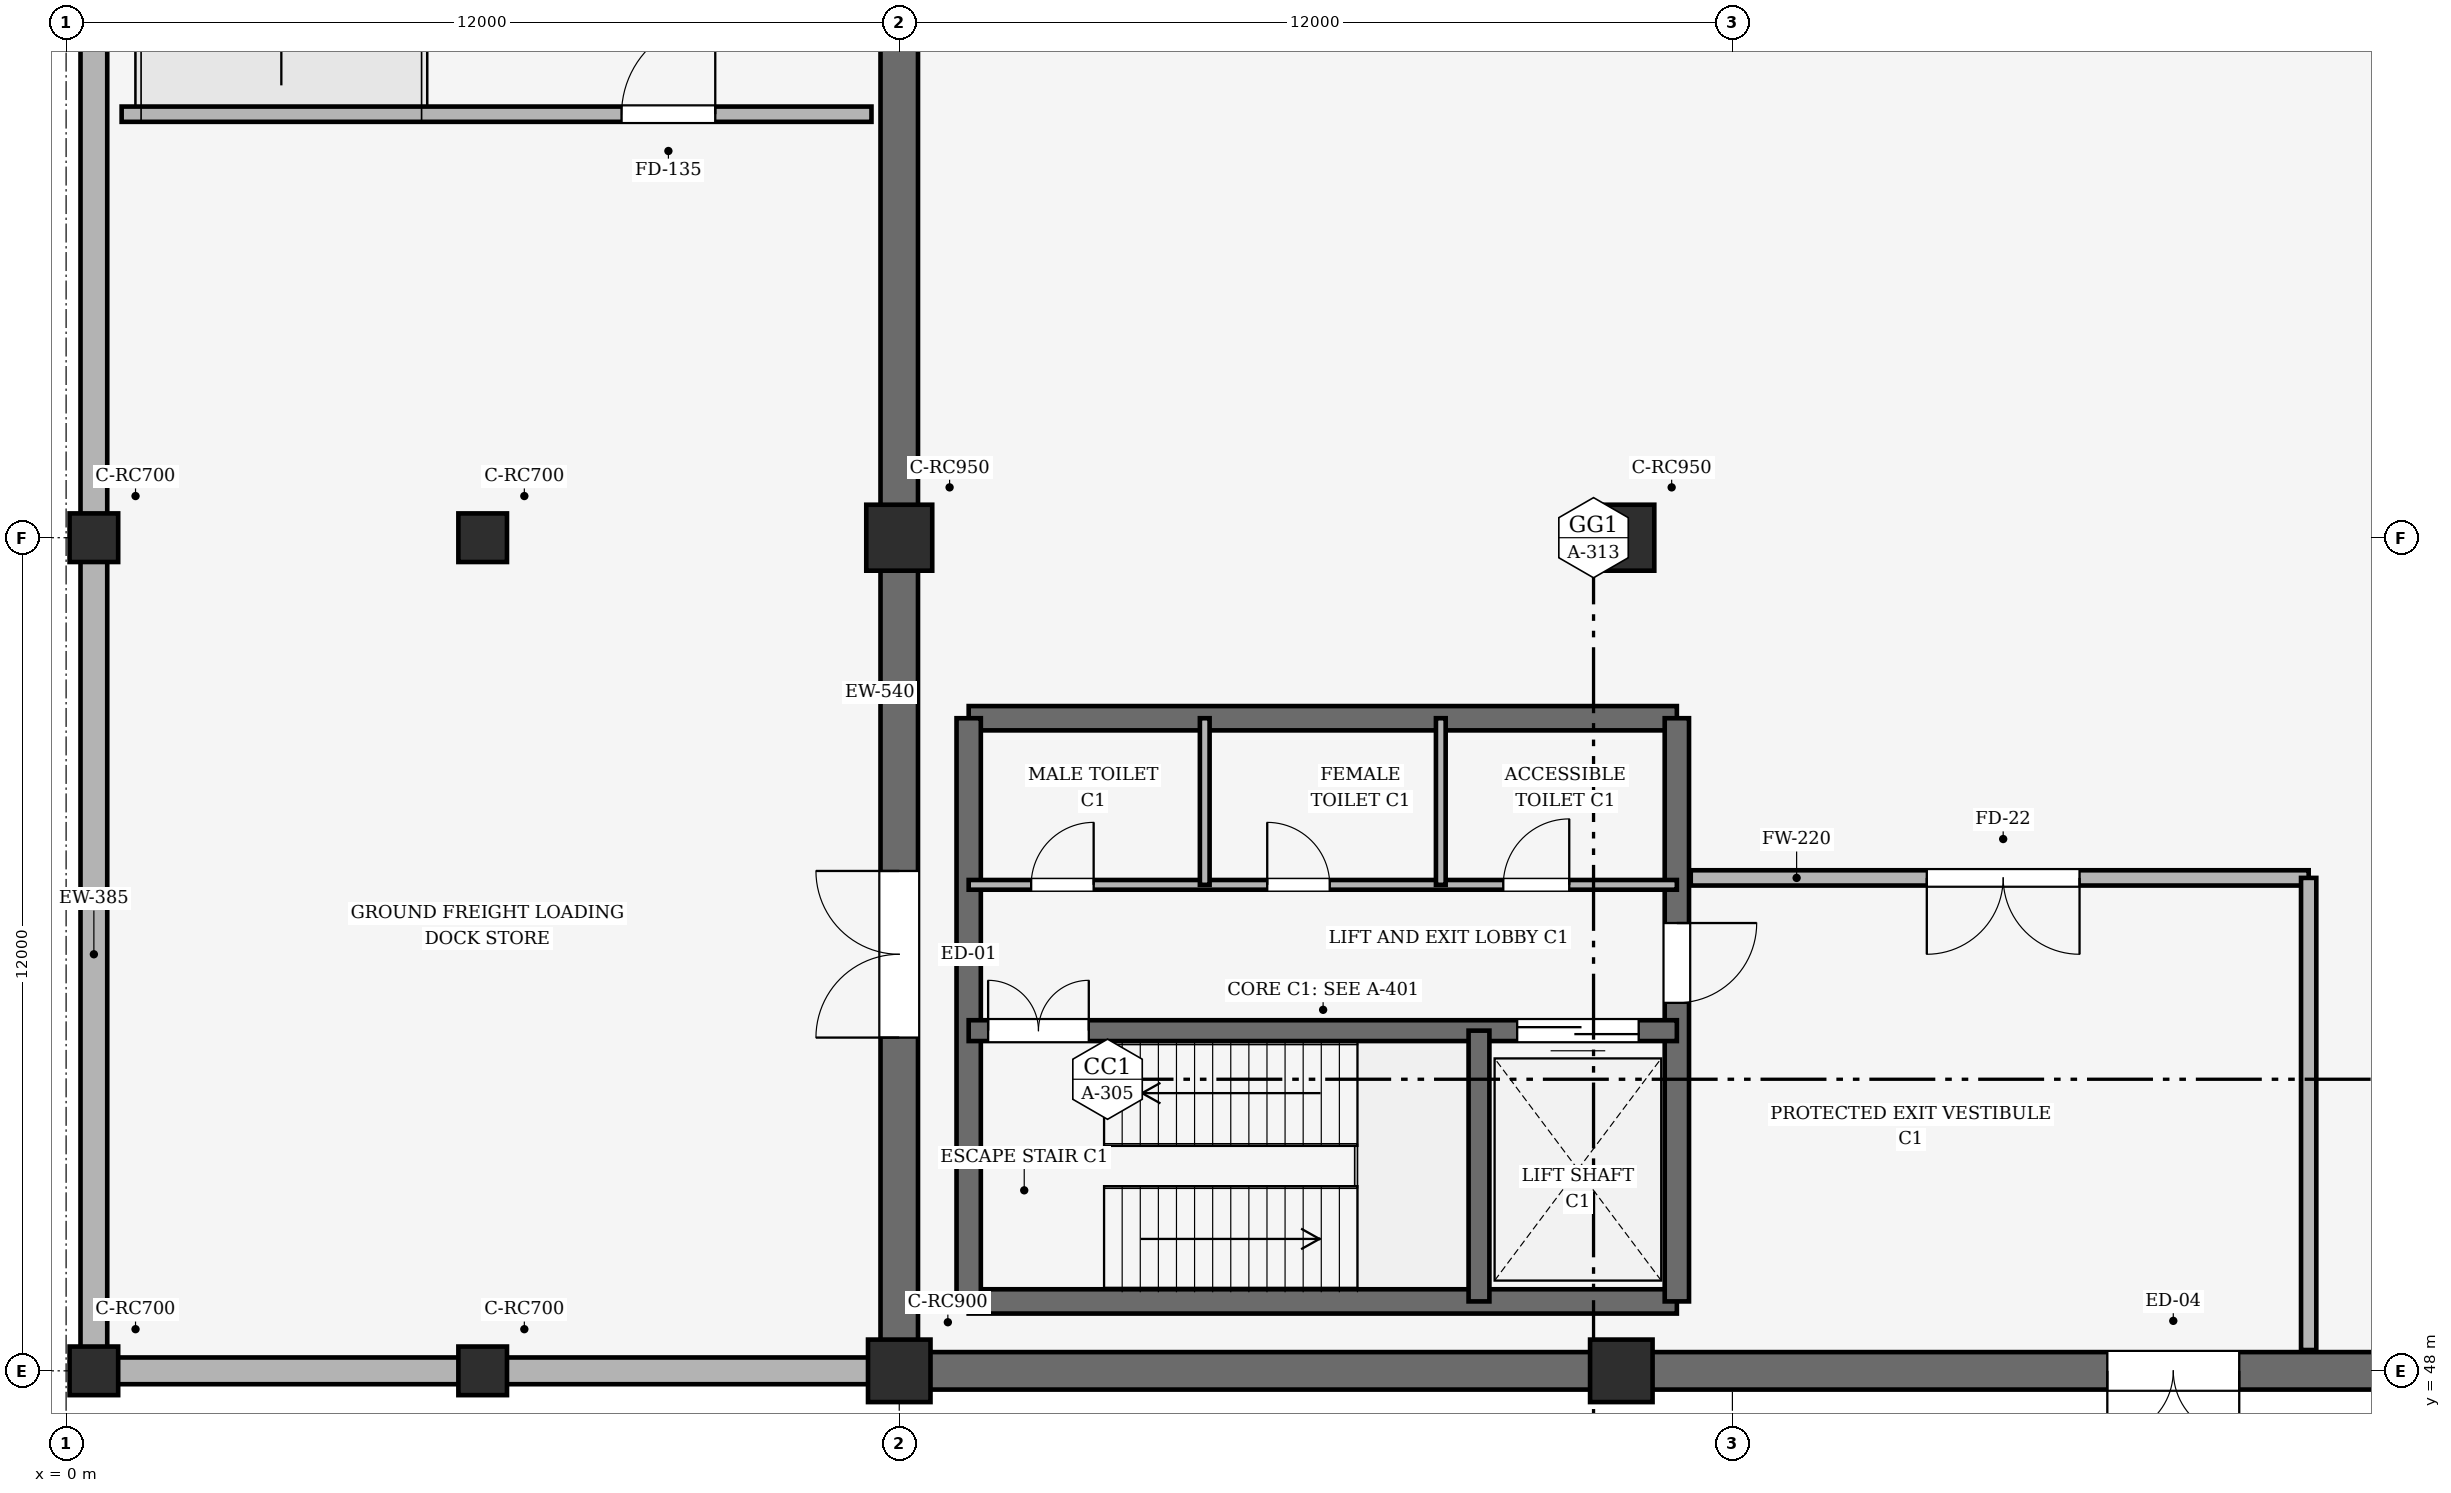
"""IFC4 building model, lengths in metres.
Left out: names, types, materials, properties, quantities, classifications, styles, units other than length and angle.
Written with IfcOpenShell. Run it as: python <this file> out.ifc"""

import sys

from ifc_helpers import new_model, si_unit, direction, frame, frame_2d, origin, origin_2d, place, context, subcontext, project, spatial, rectangle, extrude, element, fill, save


model = new_model("IFC4")
c1 = context("Model", 3, precision=1e-05, world=origin(), true_north=direction((0.0, 1.0)))
c2 = subcontext(c1, "Body", "Model", "MODEL_VIEW")
j1 = project(units=[si_unit("LENGTHUNIT", "METRE"), si_unit("PLANEANGLEUNIT", "RADIAN")], contexts=[c1])
p1 = place(None, origin())
s1 = spatial("IfcSite", under=j1, at=p1, CompositionType="ELEMENT")
p2 = place(p1, origin())
s2 = spatial("IfcBuilding", under=s1, at=p2, CompositionType="ELEMENT")
p3 = place(p2, origin())
s3 = spatial("IfcBuildingStorey", under=s2, at=p3, CompositionType="ELEMENT", Elevation=0.0)
for number, where, z_axis, x_axis in (
    (1, (12.0, 48.0, -0.44), (0.0, 0.0, 1.0), (1.0, 0.0, 0.0)),
    (2, (22.4, 48.0, -0.44), (0.0, 0.0, 1.0), (1.0, 0.0, 0.0)),
):
    element("IfcColumn", number, at=place(p3, frame(where, z_axis=z_axis, x_axis=x_axis)), inside=s3, PredefinedType="COLUMN", context=c2, shape_type="SweptSolid", body=[
        extrude(rectangle(XDim=0.9, YDim=0.9, at=origin_2d()), origin(), (0.0, 0.0, 1.0), 5.84),
    ])
for number, where, z_axis, x_axis in (
    (3, (12.0, 60.0, -0.44), (0.0, 0.0, 1.0), (1.0, 0.0, 0.0)),
    (4, (22.4, 60.0, -0.44), (0.0, 0.0, 1.0), (1.0, 0.0, 0.0)),
):
    element("IfcColumn", number, at=place(p3, frame(where, z_axis=z_axis, x_axis=x_axis)), inside=s3, PredefinedType="COLUMN", context=c2, shape_type="SweptSolid", body=[
        extrude(rectangle(XDim=0.95, YDim=0.95, at=origin_2d()), origin(), (0.0, 0.0, 1.0), 5.84),
    ])
for number, where, z_axis, x_axis in (
    (5, (0.4, 48.0, -0.44), (0.0, 0.0, 1.0), (1.0, 0.0, 0.0)),
    (6, (6.0, 48.0, -0.44), (0.0, 0.0, 1.0), (1.0, 0.0, 0.0)),
    (7, (0.4, 60.0, -0.44), (0.0, 0.0, 1.0), (1.0, 0.0, 0.0)),
    (8, (6.0, 60.0, -0.44), (0.0, 0.0, 1.0), (1.0, 0.0, 0.0)),
):
    element("IfcColumn", number, at=place(p3, frame(where, z_axis=z_axis, x_axis=x_axis)), inside=s3, PredefinedType="COLUMN", context=c2, shape_type="SweptSolid", body=[
        extrude(rectangle(XDim=0.7, YDim=0.7, at=origin_2d()), origin(), (0.0, 0.0, 1.0), 5.84),
    ])
p4 = place(p3, frame((12.0, 60.0, 0.0), z_axis=(0.0, 0.0, 1.0), x_axis=(0.0, -1.0, 0.0)))
e9 = element("IfcWall", 9, at=p4, inside=s3, PredefinedType="SOLIDWALL", context=c2, shape_type="SweptSolid", body=[
    extrude(rectangle(XDim=12.0, YDim=0.54, at=frame_2d((6.0, 0.0))), origin(), (0.0, 0.0, 1.0), 4.95),
])
p5 = place(p4, frame((4.8, 0.0, 0.0)))
e10 = element("IfcOpeningElement", 10, at=p5, cuts=e9, PredefinedType="OPENING", context=c2, shape_type="SweptSolid", body=[
    extrude(rectangle(XDim=2.4, YDim=2.65, at=frame_2d((1.2, 1.325))), frame((0.0, 0.28, 0.0), z_axis=(0.0, -1.0, 0.0), x_axis=(1.0, 0.0, 0.0)), (0.0, 0.0, 1.0), 0.56),
])
p6 = place(p3, frame((12.0, 72.0, 0.0), z_axis=(0.0, 0.0, 1.0), x_axis=(0.0, -1.0, 0.0)))
e11 = element("IfcWall", 11, at=p6, inside=s3, PredefinedType="SOLIDWALL", context=c2, shape_type="SweptSolid", body=[
    extrude(rectangle(XDim=12.0, YDim=0.54, at=frame_2d((6.0, 0.0))), origin(), (0.0, 0.0, 1.0), 4.95),
])
p7 = place(p6, frame((2.0, 0.0, 0.0)))
e12 = element("IfcOpeningElement", 12, at=p7, cuts=e11, PredefinedType="OPENING", context=c2, shape_type="SweptSolid", body=[
    extrude(rectangle(XDim=2.3, YDim=2.55, at=frame_2d((1.15, 1.275))), frame((0.0, 0.28, 0.0), z_axis=(0.0, -1.0, 0.0), x_axis=(1.0, 0.0, 0.0)), (0.0, 0.0, 1.0), 0.56),
])
p8 = place(p3, frame((12.0, 48.0, 0.0), z_axis=(0.0, 0.0, 1.0), x_axis=(1.0, 0.0, 0.0)))
e13 = element("IfcWall", 13, at=p8, inside=s3, PredefinedType="SOLIDWALL", context=c2, shape_type="SweptSolid", body=[
    extrude(rectangle(XDim=10.4, YDim=0.54, at=frame_2d((5.2, 0.0))), origin(), (0.0, 0.0, 1.0), 4.95),
])
p9 = place(p3, frame((22.4, 48.0, 0.0), z_axis=(0.0, 0.0, 1.0), x_axis=(1.0, 0.0, 0.0)))
e14 = element("IfcWall", 14, at=p9, inside=s3, PredefinedType="SOLIDWALL", context=c2, shape_type="SweptSolid", body=[
    extrude(rectangle(XDim=33.2, YDim=0.54, at=frame_2d((16.6, 0.0))), origin(), (0.0, 0.0, 1.0), 4.95),
])
p10 = place(p9, frame((7.0, 0.0, 0.0)))
e15 = element("IfcOpeningElement", 15, at=p10, cuts=e14, PredefinedType="OPENING", context=c2, shape_type="SweptSolid", body=[
    extrude(rectangle(XDim=1.9, YDim=2.35, at=frame_2d((0.95, 1.175))), frame((0.0, 0.28, 0.0), z_axis=(0.0, -1.0, 0.0), x_axis=(1.0, 0.0, 0.0)), (0.0, 0.0, 1.0), 0.56),
])
p11 = place(p9, frame((23.0, 0.0, 0.0)))
e16 = element("IfcOpeningElement", 16, at=p11, cuts=e14, PredefinedType="OPENING", context=c2, shape_type="SweptSolid", body=[
    extrude(rectangle(XDim=2.4, YDim=2.65, at=frame_2d((1.2, 1.325))), frame((0.0, 0.28, 0.0), z_axis=(0.0, -1.0, 0.0), x_axis=(1.0, 0.0, 0.0)), (0.0, 0.0, 1.0), 0.56),
])
p12 = place(p3, frame((0.4, 60.0, 0.0), z_axis=(0.0, 0.0, 1.0), x_axis=(0.0, -1.0, 0.0)))
e17 = element("IfcWall", 17, at=p12, inside=s3, PredefinedType="SOLIDWALL", context=c2, shape_type="SweptSolid", body=[
    extrude(rectangle(XDim=12.0, YDim=0.385, at=frame_2d((6.0, 0.0))), origin(), (0.0, 0.0, 1.0), 4.2),
])
p13 = place(p3, frame((0.4, 72.0, 0.0), z_axis=(0.0, 0.0, 1.0), x_axis=(0.0, -1.0, 0.0)))
e18 = element("IfcWall", 18, at=p13, inside=s3, PredefinedType="SOLIDWALL", context=c2, shape_type="SweptSolid", body=[
    extrude(rectangle(XDim=12.0, YDim=0.385, at=frame_2d((6.0, 0.0))), origin(), (0.0, 0.0, 1.0), 3.738),
])
p14 = place(p3, frame((0.4, 48.0, 0.0), z_axis=(0.0, 0.0, 1.0), x_axis=(1.0, 0.0, 0.0)))
e19 = element("IfcWall", 19, at=p14, inside=s3, PredefinedType="SOLIDWALL", context=c2, shape_type="SweptSolid", body=[
    extrude(rectangle(XDim=11.6, YDim=0.385, at=frame_2d((5.8, 0.0))), origin(), (0.0, 0.0, 1.0), 4.2),
])
for number, where, z_axis, x_axis in (
    (20, (13.0, 49.0, 0.0), (0.0, 0.0, 1.0), (1.0, 0.0, 0.0)),
    (21, (23.2, 57.4, 0.0), (0.0, 0.0, 1.0), (-1.0, 0.0, 0.0)),
):
    element("IfcWall", number, at=place(p3, frame(where, z_axis=z_axis, x_axis=x_axis)), inside=s3, PredefinedType="SHEAR", context=c2, shape_type="SweptSolid", body=[
        extrude(rectangle(XDim=10.2, YDim=0.35, at=frame_2d((5.1, 0.0))), origin(), (0.0, 0.0, 1.0), 5.4),
    ])
p15 = place(p3, frame((13.0, 57.4, 0.0), z_axis=(0.0, 0.0, 1.0), x_axis=(0.0, -1.0, 0.0)))
e22 = element("IfcWall", 22, at=p15, inside=s3, PredefinedType="SHEAR", context=c2, shape_type="SweptSolid", body=[
    extrude(rectangle(XDim=8.4, YDim=0.35, at=frame_2d((4.2, 0.0))), origin(), (0.0, 0.0, 1.0), 5.4),
])
p16 = place(p3, frame((23.2, 49.0, 0.0), z_axis=(0.0, 0.0, 1.0), x_axis=(0.0, 1.0, 0.0)))
e23 = element("IfcWall", 23, at=p16, inside=s3, PredefinedType="SHEAR", context=c2, shape_type="SweptSolid", body=[
    extrude(rectangle(XDim=8.4, YDim=0.35, at=frame_2d((4.2, 0.0))), origin(), (0.0, 0.0, 1.0), 5.4),
])
p17 = place(p16, frame((4.3, 0.0, 0.0)))
e24 = element("IfcOpeningElement", 24, at=p17, cuts=e23, PredefinedType="OPENING", context=c2, shape_type="SweptSolid", body=[
    extrude(rectangle(XDim=1.15, YDim=2.15, at=frame_2d((0.575, 1.075))), frame((0.0, 0.185, 0.0), z_axis=(0.0, -1.0, 0.0), x_axis=(1.0, 0.0, 0.0)), (0.0, 0.0, 1.0), 0.37),
])
p18 = place(p3, frame((13.0, 52.9, 0.0), z_axis=(0.0, 0.0, 1.0), x_axis=(1.0, 0.0, 0.0)))
e25 = element("IfcWall", 25, at=p18, inside=s3, PredefinedType="SHEAR", context=c2, shape_type="SweptSolid", body=[
    extrude(rectangle(XDim=10.2, YDim=0.3, at=frame_2d((5.1, 0.0))), origin(), (0.0, 0.0, 1.0), 5.4),
])
p19 = place(p18, frame((0.28, 0.0, 0.0)))
e26 = element("IfcOpeningElement", 26, at=p19, cuts=e25, PredefinedType="OPENING", context=c2, shape_type="SweptSolid", body=[
    extrude(rectangle(XDim=1.45, YDim=2.15, at=frame_2d((0.725, 1.075))), frame((0.0, 0.16, 0.0), z_axis=(0.0, -1.0, 0.0), x_axis=(1.0, 0.0, 0.0)), (0.0, 0.0, 1.0), 0.32),
])
p20 = place(p18, frame((7.9, 0.0, 0.0)))
e27 = element("IfcOpeningElement", 27, at=p20, cuts=e25, PredefinedType="OPENING", context=c2, shape_type="SweptSolid", body=[
    extrude(rectangle(XDim=1.75, YDim=2.3, at=frame_2d((0.875, 1.15))), frame((0.0, 0.16, 0.0), z_axis=(0.0, -1.0, 0.0), x_axis=(1.0, 0.0, 0.0)), (0.0, 0.0, 1.0), 0.32),
])
p21 = place(p3, frame((20.35, 49.0, 0.0), z_axis=(0.0, 0.0, 1.0), x_axis=(0.0, 1.0, 0.0)))
e28 = element("IfcWall", 28, at=p21, inside=s3, PredefinedType="SHEAR", context=c2, shape_type="SweptSolid", body=[
    extrude(rectangle(XDim=3.9, YDim=0.3, at=frame_2d((1.95, 0.0))), origin(), (0.0, 0.0, 1.0), 5.4),
])
p22 = place(p3, frame((13.0, 55.0, 0.0), z_axis=(0.0, 0.0, 1.0), x_axis=(1.0, 0.0, 0.0)))
e29 = element("IfcWall", 29, at=p22, inside=s3, PredefinedType="PARTITIONING", context=c2, shape_type="SweptSolid", body=[
    extrude(rectangle(XDim=10.2, YDim=0.14, at=frame_2d((5.1, 0.0))), origin(), (0.0, 0.0, 1.0), 4.5),
])
p23 = place(p22, frame((0.9, 0.0, 0.0)))
e30 = element("IfcOpeningElement", 30, at=p23, cuts=e29, PredefinedType="OPENING", context=c2, shape_type="SweptSolid", body=[
    extrude(rectangle(XDim=0.9, YDim=2.1, at=frame_2d((0.45, 1.05))), frame((0.0, 0.08, 0.0), z_axis=(0.0, -1.0, 0.0), x_axis=(1.0, 0.0, 0.0)), (0.0, 0.0, 1.0), 0.16),
])
p24 = place(p22, frame((4.3, 0.0, 0.0)))
e31 = element("IfcOpeningElement", 31, at=p24, cuts=e29, PredefinedType="OPENING", context=c2, shape_type="SweptSolid", body=[
    extrude(rectangle(XDim=0.9, YDim=2.1, at=frame_2d((0.45, 1.05))), frame((0.0, 0.08, 0.0), z_axis=(0.0, -1.0, 0.0), x_axis=(1.0, 0.0, 0.0)), (0.0, 0.0, 1.0), 0.16),
])
p25 = place(p22, frame((7.7, 0.0, 0.0)))
e32 = element("IfcOpeningElement", 32, at=p25, cuts=e29, PredefinedType="OPENING", context=c2, shape_type="SweptSolid", body=[
    extrude(rectangle(XDim=0.95, YDim=2.1, at=frame_2d((0.475, 1.05))), frame((0.0, 0.08, 0.0), z_axis=(0.0, -1.0, 0.0), x_axis=(1.0, 0.0, 0.0)), (0.0, 0.0, 1.0), 0.16),
])
for number, where, z_axis, x_axis in (
    (33, (16.4, 55.0, 0.0), (0.0, 0.0, 1.0), (0.0, 1.0, 0.0)),
    (34, (19.8, 55.0, 0.0), (0.0, 0.0, 1.0), (0.0, 1.0, 0.0)),
):
    element("IfcWall", number, at=place(p3, frame(where, z_axis=z_axis, x_axis=x_axis)), inside=s3, PredefinedType="PARTITIONING", context=c2, shape_type="SweptSolid", body=[
        extrude(rectangle(XDim=2.4, YDim=0.14, at=frame_2d((1.2, 0.0))), origin(), (0.0, 0.0, 1.0), 4.5),
    ])
p26 = place(p3, frame((23.4, 55.1, 0.0), z_axis=(0.0, 0.0, 1.0), x_axis=(1.0, 0.0, 0.0)))
e35 = element("IfcWall", 35, at=p26, inside=s3, PredefinedType="SOLIDWALL", context=c2, shape_type="SweptSolid", body=[
    extrude(rectangle(XDim=8.9, YDim=0.22, at=frame_2d((4.45, 0.0))), origin(), (0.0, 0.0, 1.0), 4.9),
])
p27 = place(p26, frame((3.4, 0.0, 0.0)))
e36 = element("IfcOpeningElement", 36, at=p27, cuts=e35, PredefinedType="OPENING", context=c2, shape_type="SweptSolid", body=[
    extrude(rectangle(XDim=2.2, YDim=2.3, at=frame_2d((1.1, 1.15))), frame((0.0, 0.12, 0.0), z_axis=(0.0, -1.0, 0.0), x_axis=(1.0, 0.0, 0.0)), (0.0, 0.0, 1.0), 0.24),
])
p28 = place(p3, frame((32.3, 48.3, 0.0), z_axis=(0.0, 0.0, 1.0), x_axis=(0.0, 1.0, 0.0)))
e37 = element("IfcWall", 37, at=p28, inside=s3, PredefinedType="SOLIDWALL", context=c2, shape_type="SweptSolid", body=[
    extrude(rectangle(XDim=6.8, YDim=0.22, at=frame_2d((3.4, 0.0))), origin(), (0.0, 0.0, 1.0), 4.9),
])
p29 = place(p3, frame((0.8, 66.1, 0.0), z_axis=(0.0, 0.0, 1.0), x_axis=(1.0, 0.0, 0.0)))
e38 = element("IfcWall", 38, at=p29, inside=s3, PredefinedType="SOLIDWALL", context=c2, shape_type="SweptSolid", body=[
    extrude(rectangle(XDim=10.8, YDim=0.22, at=frame_2d((5.4, 0.0))), origin(), (0.0, 0.0, 1.0), 4.1),
])
p30 = place(p29, frame((7.2, 0.0, 0.0)))
e39 = element("IfcOpeningElement", 39, at=p30, cuts=e38, PredefinedType="OPENING", context=c2, shape_type="SweptSolid", body=[
    extrude(rectangle(XDim=1.35, YDim=2.2, at=frame_2d((0.675, 1.1))), frame((0.0, 0.12, 0.0), z_axis=(0.0, -1.0, 0.0), x_axis=(1.0, 0.0, 0.0)), (0.0, 0.0, 1.0), 0.24),
])
p31 = place(p5, frame((2.4, 0.0, 0.0), z_axis=(0.0, 0.0, 1.0), x_axis=(-1.0, 0.0, 0.0)))
e40 = element("IfcDoor", 40, at=p31, inside=s3, OperationType="DOUBLE_DOOR_SINGLE_SWING", PredefinedType="DOOR", context=c2, shape_type="SweptSolid", body=[
    extrude(rectangle(XDim=2.4, YDim=2.65, at=frame_2d((1.2, 1.325))), frame((0.0, 0.025, 0.0), z_axis=(0.0, -1.0, 0.0), x_axis=(1.0, 0.0, 0.0)), (0.0, 0.0, 1.0), 0.05),
])
fill(e10, e40)
p32 = place(p10, frame((1.9, 0.0, 0.0), z_axis=(0.0, 0.0, 1.0), x_axis=(-1.0, 0.0, 0.0)))
e41 = element("IfcDoor", 41, at=p32, inside=s3, OperationType="DOUBLE_DOOR_SINGLE_SWING", PredefinedType="DOOR", context=c2, shape_type="SweptSolid", body=[
    extrude(rectangle(XDim=1.9, YDim=2.35, at=frame_2d((0.95, 1.175))), frame((0.0, 0.025, 0.0), z_axis=(0.0, -1.0, 0.0), x_axis=(1.0, 0.0, 0.0)), (0.0, 0.0, 1.0), 0.05),
])
fill(e15, e41)
p33 = place(p17, frame((1.15, 0.0, 0.0), z_axis=(0.0, 0.0, 1.0), x_axis=(-1.0, 0.0, 0.0)))
e42 = element("IfcDoor", 42, at=p33, inside=s3, OperationType="SINGLE_SWING_LEFT", PredefinedType="DOOR", context=c2, shape_type="SweptSolid", body=[
    extrude(rectangle(XDim=1.15, YDim=2.15, at=frame_2d((0.575, 1.075))), frame((0.0, 0.025, 0.0), z_axis=(0.0, -1.0, 0.0), x_axis=(1.0, 0.0, 0.0)), (0.0, 0.0, 1.0), 0.05),
])
fill(e24, e42)
p34 = place(p19, origin())
e43 = element("IfcDoor", 43, at=p34, inside=s3, OperationType="DOUBLE_DOOR_SINGLE_SWING", PredefinedType="DOOR", context=c2, shape_type="SweptSolid", body=[
    extrude(rectangle(XDim=1.45, YDim=2.15, at=frame_2d((0.725, 1.075))), frame((0.0, 0.025, 0.0), z_axis=(0.0, -1.0, 0.0), x_axis=(1.0, 0.0, 0.0)), (0.0, 0.0, 1.0), 0.05),
])
fill(e26, e43)
p35 = place(p20, origin())
e44 = element("IfcDoor", 44, at=p35, inside=s3, OperationType="DOUBLE_DOOR_SLIDING", PredefinedType="DOOR", context=c2, shape_type="SweptSolid", body=[
    extrude(rectangle(XDim=1.75, YDim=2.3, at=frame_2d((0.875, 1.15))), frame((0.0, 0.025, 0.0), z_axis=(0.0, -1.0, 0.0), x_axis=(1.0, 0.0, 0.0)), (0.0, 0.0, 1.0), 0.05),
])
fill(e27, e44)
p36 = place(p23, origin())
e45 = element("IfcDoor", 45, at=p36, inside=s3, OperationType="SINGLE_SWING_RIGHT", PredefinedType="DOOR", context=c2, shape_type="SweptSolid", body=[
    extrude(rectangle(XDim=0.9, YDim=2.1, at=frame_2d((0.45, 1.05))), frame((0.0, 0.025, 0.0), z_axis=(0.0, -1.0, 0.0), x_axis=(1.0, 0.0, 0.0)), (0.0, 0.0, 1.0), 0.05),
])
fill(e30, e45)
p37 = place(p24, origin())
e46 = element("IfcDoor", 46, at=p37, inside=s3, OperationType="SINGLE_SWING_LEFT", PredefinedType="DOOR", context=c2, shape_type="SweptSolid", body=[
    extrude(rectangle(XDim=0.9, YDim=2.1, at=frame_2d((0.45, 1.05))), frame((0.0, 0.025, 0.0), z_axis=(0.0, -1.0, 0.0), x_axis=(1.0, 0.0, 0.0)), (0.0, 0.0, 1.0), 0.05),
])
fill(e31, e46)
p38 = place(p25, origin())
e47 = element("IfcDoor", 47, at=p38, inside=s3, OperationType="SINGLE_SWING_RIGHT", PredefinedType="DOOR", context=c2, shape_type="SweptSolid", body=[
    extrude(rectangle(XDim=0.95, YDim=2.1, at=frame_2d((0.475, 1.05))), frame((0.0, 0.025, 0.0), z_axis=(0.0, -1.0, 0.0), x_axis=(1.0, 0.0, 0.0)), (0.0, 0.0, 1.0), 0.05),
])
fill(e32, e47)
p39 = place(p27, frame((2.2, 0.0, 0.0), z_axis=(0.0, 0.0, 1.0), x_axis=(-1.0, 0.0, 0.0)))
e48 = element("IfcDoor", 48, at=p39, inside=s3, OperationType="DOUBLE_DOOR_SINGLE_SWING", PredefinedType="DOOR", context=c2, shape_type="SweptSolid", body=[
    extrude(rectangle(XDim=2.2, YDim=2.3, at=frame_2d((1.1, 1.15))), frame((0.0, 0.025, 0.0), z_axis=(0.0, -1.0, 0.0), x_axis=(1.0, 0.0, 0.0)), (0.0, 0.0, 1.0), 0.05),
])
fill(e36, e48)
p40 = place(p30, origin())
e49 = element("IfcDoor", 49, at=p40, inside=s3, OperationType="SINGLE_SWING_RIGHT", PredefinedType="DOOR", context=c2, shape_type="SweptSolid", body=[
    extrude(rectangle(XDim=1.35, YDim=2.2, at=frame_2d((0.675, 1.1))), frame((0.0, 0.025, 0.0), z_axis=(0.0, -1.0, 0.0), x_axis=(1.0, 0.0, 0.0)), (0.0, 0.0, 1.0), 0.05),
])
fill(e39, e49)
save(model, sys.argv[1])
